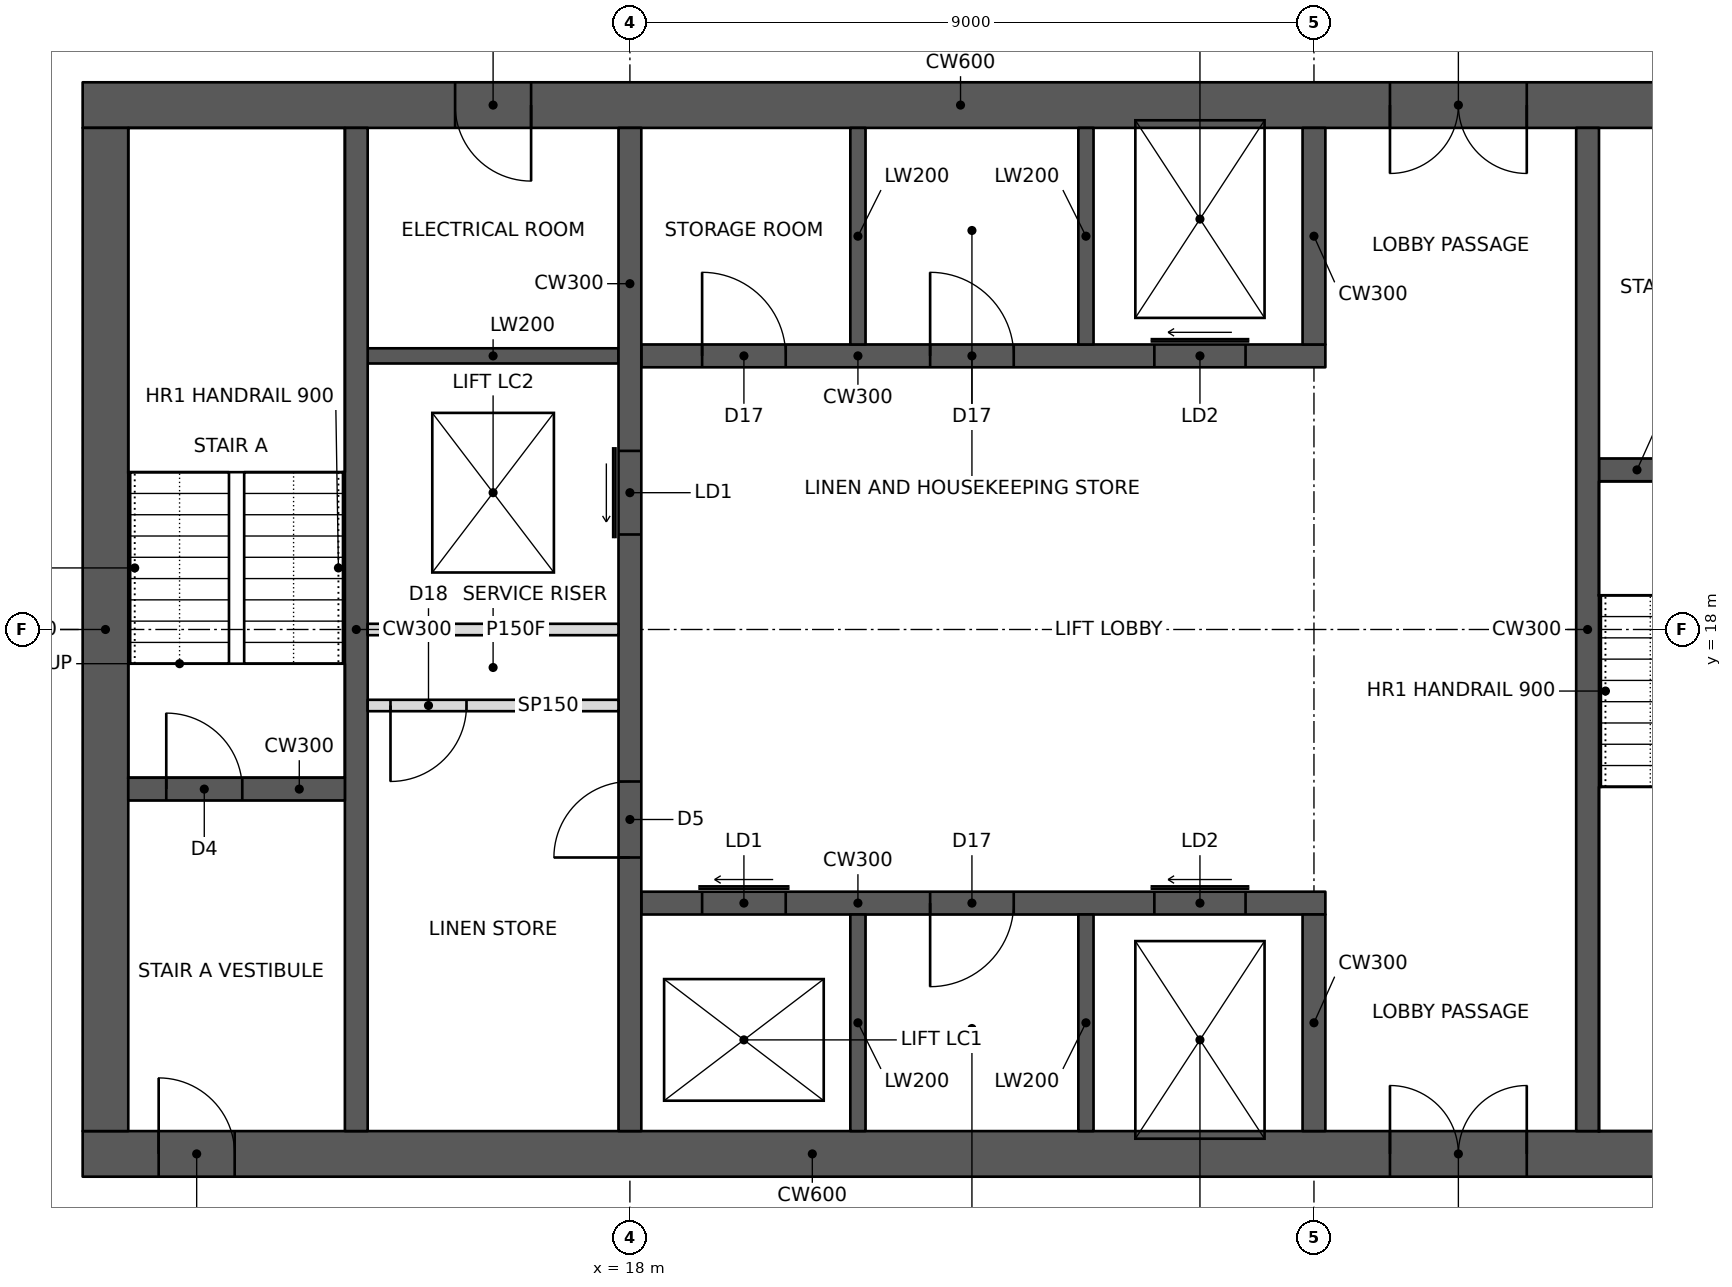
"""IFC4 building model, lengths in metres.
Left out: names, types, materials, properties, quantities, classifications, styles, units other than length and angle.
Written with IfcOpenShell. Run it as: python <this file> out.ifc"""

import sys

from ifc_helpers import new_model, si_unit, direction, frame, frame_2d, origin, place, context, subcontext, project, spatial, rectangle, extrude, element, fill, save


model = new_model("IFC4")
c1 = context("Model", 3, precision=1e-05, world=origin(), true_north=direction((0.0, 1.0)))
c2 = subcontext(c1, "Body", "Model", "MODEL_VIEW")
j1 = project(units=[si_unit("LENGTHUNIT", "METRE"), si_unit("PLANEANGLEUNIT", "RADIAN")], contexts=[c1])
p1 = place(None, origin())
s1 = spatial("IfcSite", under=j1, at=p1, CompositionType="ELEMENT")
p2 = place(p1, origin())
s2 = spatial("IfcBuilding", under=s1, at=p2, CompositionType="ELEMENT")
p3 = place(p2, frame((0.0, 0.0, 177.4)))
s3 = spatial("IfcBuildingStorey", under=s2, at=p3, CompositionType="ELEMENT", Elevation=177.4)
p4 = place(p3, frame((10.8, 11.1, 0.0), z_axis=(0.0, 0.0, 1.0), x_axis=(1.0, 0.0, 0.0)))
e1 = element("IfcWall", 1, at=p4, inside=s3, PredefinedType="SHEAR", context=c2, shape_type="SweptSolid", body=[
    extrude(rectangle(XDim=23.4, YDim=0.6, at=frame_2d((11.7, 0.0))), origin(), (0.0, 0.0, 1.0), 3.4),
])
p5 = place(p4, frame((1.0, 0.0, 0.0)))
e2 = element("IfcOpeningElement", 2, at=p5, cuts=e1, PredefinedType="OPENING", context=c2, shape_type="SweptSolid", body=[
    extrude(rectangle(XDim=1.0, YDim=2.1, at=frame_2d((0.5, 1.05))), frame((0.0, 0.31, 0.0), z_axis=(0.0, -1.0, 0.0), x_axis=(1.0, 0.0, 0.0)), (0.0, 0.0, 1.0), 0.62),
])
p6 = place(p4, frame((17.2, 0.0, 0.0)))
e3 = element("IfcOpeningElement", 3, at=p6, cuts=e1, PredefinedType="OPENING", context=c2, shape_type="SweptSolid", body=[
    extrude(rectangle(XDim=1.8, YDim=2.1, at=frame_2d((0.9, 1.05))), frame((0.0, 0.31, 0.0), z_axis=(0.0, -1.0, 0.0), x_axis=(1.0, 0.0, 0.0)), (0.0, 0.0, 1.0), 0.62),
])
p7 = place(p3, frame((10.8, 24.9, 0.0), z_axis=(0.0, 0.0, 1.0), x_axis=(1.0, 0.0, 0.0)))
e4 = element("IfcWall", 4, at=p7, inside=s3, PredefinedType="SHEAR", context=c2, shape_type="SweptSolid", body=[
    extrude(rectangle(XDim=23.4, YDim=0.6, at=frame_2d((11.7, 0.0))), origin(), (0.0, 0.0, 1.0), 3.4),
])
p8 = place(p7, frame((17.2, 0.0, 0.0)))
e5 = element("IfcOpeningElement", 5, at=p8, cuts=e4, PredefinedType="OPENING", context=c2, shape_type="SweptSolid", body=[
    extrude(rectangle(XDim=1.8, YDim=2.1, at=frame_2d((0.9, 1.05))), frame((0.0, 0.31, 0.0), z_axis=(0.0, -1.0, 0.0), x_axis=(1.0, 0.0, 0.0)), (0.0, 0.0, 1.0), 0.62),
])
p9 = place(p7, frame((21.1, 0.0, 0.0)))
e6 = element("IfcOpeningElement", 6, at=p9, cuts=e4, PredefinedType="OPENING", context=c2, shape_type="SweptSolid", body=[
    extrude(rectangle(XDim=1.0, YDim=2.1, at=frame_2d((0.5, 1.05))), frame((0.0, 0.31, 0.0), z_axis=(0.0, -1.0, 0.0), x_axis=(1.0, 0.0, 0.0)), (0.0, 0.0, 1.0), 0.62),
])
p10 = place(p7, frame((4.9, 0.0, 0.0)))
e7 = element("IfcOpeningElement", 7, at=p10, cuts=e4, PredefinedType="OPENING", context=c2, shape_type="SweptSolid", body=[
    extrude(rectangle(XDim=1.0, YDim=2.1, at=frame_2d((0.5, 1.05))), frame((0.0, 0.31, 0.0), z_axis=(0.0, -1.0, 0.0), x_axis=(1.0, 0.0, 0.0)), (0.0, 0.0, 1.0), 0.62),
])
p11 = place(p3, frame((11.1, 11.4, 0.0), z_axis=(0.0, 0.0, 1.0), x_axis=(0.0, 1.0, 0.0)))
e8 = element("IfcWall", 8, at=p11, inside=s3, PredefinedType="SHEAR", context=c2, shape_type="SweptSolid", body=[
    extrude(rectangle(XDim=13.2, YDim=0.6, at=frame_2d((6.6, 0.0))), origin(), (0.0, 0.0, 1.0), 3.4),
])
p12 = place(p3, frame((14.4, 11.4, 0.0), z_axis=(0.0, 0.0, 1.0), x_axis=(0.0, 1.0, 0.0)))
e9 = element("IfcWall", 9, at=p12, inside=s3, PredefinedType="SHEAR", context=c2, shape_type="SweptSolid", body=[
    extrude(rectangle(XDim=13.2, YDim=0.3, at=frame_2d((6.6, 0.0))), origin(), (0.0, 0.0, 1.0), 3.4),
])
p13 = place(p3, frame((11.4, 15.9, 0.0), z_axis=(0.0, 0.0, 1.0), x_axis=(1.0, 0.0, 0.0)))
e10 = element("IfcWall", 10, at=p13, inside=s3, PredefinedType="SHEAR", context=c2, shape_type="SweptSolid", body=[
    extrude(rectangle(XDim=2.85, YDim=0.3, at=frame_2d((1.425, 0.0))), origin(), (0.0, 0.0, 1.0), 3.4),
])
p14 = place(p13, frame((0.5, 0.0, 0.0)))
e11 = element("IfcOpeningElement", 11, at=p14, cuts=e10, PredefinedType="OPENING", context=c2, shape_type="SweptSolid", body=[
    extrude(rectangle(XDim=1.0, YDim=2.1, at=frame_2d((0.5, 1.05))), frame((0.0, 0.16, 0.0), z_axis=(0.0, -1.0, 0.0), x_axis=(1.0, 0.0, 0.0)), (0.0, 0.0, 1.0), 0.32),
])
p15 = place(p3, frame((18.0, 11.4, 0.0), z_axis=(0.0, 0.0, 1.0), x_axis=(0.0, 1.0, 0.0)))
e12 = element("IfcWall", 12, at=p15, inside=s3, PredefinedType="SHEAR", context=c2, shape_type="SweptSolid", body=[
    extrude(rectangle(XDim=13.2, YDim=0.3, at=frame_2d((6.6, 0.0))), origin(), (0.0, 0.0, 1.0), 3.4),
])
p16 = place(p15, frame((3.6, 0.0, 0.0)))
e13 = element("IfcOpeningElement", 13, at=p16, cuts=e12, PredefinedType="OPENING", context=c2, shape_type="SweptSolid", body=[
    extrude(rectangle(XDim=1.0, YDim=2.1, at=frame_2d((0.5, 1.05))), frame((0.0, 0.16, 0.0), z_axis=(0.0, -1.0, 0.0), x_axis=(1.0, 0.0, 0.0)), (0.0, 0.0, 1.0), 0.32),
])
p17 = place(p15, frame((7.85, 0.0, 0.0)))
e14 = element("IfcOpeningElement", 14, at=p17, cuts=e12, PredefinedType="OPENING", context=c2, shape_type="SweptSolid", body=[
    extrude(rectangle(XDim=1.1, YDim=2.1, at=frame_2d((0.55, 1.05))), frame((0.0, 0.16, 0.0), z_axis=(0.0, -1.0, 0.0), x_axis=(1.0, 0.0, 0.0)), (0.0, 0.0, 1.0), 0.32),
])
p18 = place(p3, frame((14.55, 18.0, 0.0), z_axis=(0.0, 0.0, 1.0), x_axis=(1.0, 0.0, 0.0)))
e15 = element("IfcWall", 15, at=p18, inside=s3, PredefinedType="PARTITIONING", context=c2, shape_type="SweptSolid", body=[
    extrude(rectangle(XDim=3.3, YDim=0.15, at=frame_2d((1.65, 0.0))), origin(), (0.0, 0.0, 1.0), 3.2),
])
p19 = place(p3, frame((18.15, 14.4, 0.0), z_axis=(0.0, 0.0, 1.0), x_axis=(1.0, 0.0, 0.0)))
e16 = element("IfcWall", 16, at=p19, inside=s3, PredefinedType="SHEAR", context=c2, shape_type="SweptSolid", body=[
    extrude(rectangle(XDim=9.0, YDim=0.3, at=frame_2d((4.5, 0.0))), origin(), (0.0, 0.0, 1.0), 3.4),
])
p20 = place(p19, frame((0.8, 0.0, 0.0)))
e17 = element("IfcOpeningElement", 17, at=p20, cuts=e16, PredefinedType="OPENING", context=c2, shape_type="SweptSolid", body=[
    extrude(rectangle(XDim=1.1, YDim=2.1, at=frame_2d((0.55, 1.05))), frame((0.0, 0.16, 0.0), z_axis=(0.0, -1.0, 0.0), x_axis=(1.0, 0.0, 0.0)), (0.0, 0.0, 1.0), 0.32),
])
p21 = place(p19, frame((6.75, 0.0, 0.0)))
e18 = element("IfcOpeningElement", 18, at=p21, cuts=e16, PredefinedType="OPENING", context=c2, shape_type="SweptSolid", body=[
    extrude(rectangle(XDim=1.2, YDim=2.1, at=frame_2d((0.6, 1.05))), frame((0.0, 0.16, 0.0), z_axis=(0.0, -1.0, 0.0), x_axis=(1.0, 0.0, 0.0)), (0.0, 0.0, 1.0), 0.32),
])
p22 = place(p19, frame((3.8, 0.0, 0.0)))
e19 = element("IfcOpeningElement", 19, at=p22, cuts=e16, PredefinedType="OPENING", context=c2, shape_type="SweptSolid", body=[
    extrude(rectangle(XDim=1.1, YDim=2.1, at=frame_2d((0.55, 1.05))), frame((0.0, 0.16, 0.0), z_axis=(0.0, -1.0, 0.0), x_axis=(1.0, 0.0, 0.0)), (0.0, 0.0, 1.0), 0.32),
])
p23 = place(p3, frame((27.0, 11.4, 0.0), z_axis=(0.0, 0.0, 1.0), x_axis=(0.0, 1.0, 0.0)))
e20 = element("IfcWall", 20, at=p23, inside=s3, PredefinedType="SHEAR", context=c2, shape_type="SweptSolid", body=[
    extrude(rectangle(XDim=2.85, YDim=0.3, at=frame_2d((1.425, 0.0))), origin(), (0.0, 0.0, 1.0), 3.4),
])
for number, where, z_axis, x_axis in (
    (21, (21.0, 11.4, 0.0), (0.0, 0.0, 1.0), (0.0, 1.0, 0.0)),
    (22, (24.0, 11.4, 0.0), (0.0, 0.0, 1.0), (0.0, 1.0, 0.0)),
):
    element("IfcWall", number, at=place(p3, frame(where, z_axis=z_axis, x_axis=x_axis)), inside=s3, PredefinedType="SHEAR", context=c2, shape_type="SweptSolid", body=[
        extrude(rectangle(XDim=2.85, YDim=0.2, at=frame_2d((1.425, 0.0))), origin(), (0.0, 0.0, 1.0), 3.4),
    ])
p24 = place(p3, frame((18.15, 21.6, 0.0), z_axis=(0.0, 0.0, 1.0), x_axis=(1.0, 0.0, 0.0)))
e23 = element("IfcWall", 23, at=p24, inside=s3, PredefinedType="SHEAR", context=c2, shape_type="SweptSolid", body=[
    extrude(rectangle(XDim=9.0, YDim=0.3, at=frame_2d((4.5, 0.0))), origin(), (0.0, 0.0, 1.0), 3.4),
])
p25 = place(p24, frame((6.75, 0.0, 0.0)))
e24 = element("IfcOpeningElement", 24, at=p25, cuts=e23, PredefinedType="OPENING", context=c2, shape_type="SweptSolid", body=[
    extrude(rectangle(XDim=1.2, YDim=2.1, at=frame_2d((0.6, 1.05))), frame((0.0, 0.16, 0.0), z_axis=(0.0, -1.0, 0.0), x_axis=(1.0, 0.0, 0.0)), (0.0, 0.0, 1.0), 0.32),
])
p26 = place(p24, frame((0.8, 0.0, 0.0)))
e25 = element("IfcOpeningElement", 25, at=p26, cuts=e23, PredefinedType="OPENING", context=c2, shape_type="SweptSolid", body=[
    extrude(rectangle(XDim=1.1, YDim=2.1, at=frame_2d((0.55, 1.05))), frame((0.0, 0.16, 0.0), z_axis=(0.0, -1.0, 0.0), x_axis=(1.0, 0.0, 0.0)), (0.0, 0.0, 1.0), 0.32),
])
p27 = place(p24, frame((3.8, 0.0, 0.0)))
e26 = element("IfcOpeningElement", 26, at=p27, cuts=e23, PredefinedType="OPENING", context=c2, shape_type="SweptSolid", body=[
    extrude(rectangle(XDim=1.1, YDim=2.1, at=frame_2d((0.55, 1.05))), frame((0.0, 0.16, 0.0), z_axis=(0.0, -1.0, 0.0), x_axis=(1.0, 0.0, 0.0)), (0.0, 0.0, 1.0), 0.32),
])
p28 = place(p3, frame((27.0, 21.75, 0.0), z_axis=(0.0, 0.0, 1.0), x_axis=(0.0, 1.0, 0.0)))
e27 = element("IfcWall", 27, at=p28, inside=s3, PredefinedType="SHEAR", context=c2, shape_type="SweptSolid", body=[
    extrude(rectangle(XDim=2.85, YDim=0.3, at=frame_2d((1.425, 0.0))), origin(), (0.0, 0.0, 1.0), 3.4),
])
for number, where, z_axis, x_axis in (
    (28, (21.0, 21.75, 0.0), (0.0, 0.0, 1.0), (0.0, 1.0, 0.0)),
    (29, (24.0, 21.75, 0.0), (0.0, 0.0, 1.0), (0.0, 1.0, 0.0)),
):
    element("IfcWall", number, at=place(p3, frame(where, z_axis=z_axis, x_axis=x_axis)), inside=s3, PredefinedType="SHEAR", context=c2, shape_type="SweptSolid", body=[
        extrude(rectangle(XDim=2.85, YDim=0.2, at=frame_2d((1.425, 0.0))), origin(), (0.0, 0.0, 1.0), 3.4),
    ])
p29 = place(p3, frame((30.6, 11.4, 0.0), z_axis=(0.0, 0.0, 1.0), x_axis=(0.0, 1.0, 0.0)))
e30 = element("IfcWall", 30, at=p29, inside=s3, PredefinedType="SHEAR", context=c2, shape_type="SweptSolid", body=[
    extrude(rectangle(XDim=13.2, YDim=0.3, at=frame_2d((6.6, 0.0))), origin(), (0.0, 0.0, 1.0), 3.4),
])
p30 = place(p3, frame((30.75, 20.1, 0.0), z_axis=(0.0, 0.0, 1.0), x_axis=(1.0, 0.0, 0.0)))
e31 = element("IfcWall", 31, at=p30, inside=s3, PredefinedType="SHEAR", context=c2, shape_type="SweptSolid", body=[
    extrude(rectangle(XDim=2.85, YDim=0.3, at=frame_2d((1.425, 0.0))), origin(), (0.0, 0.0, 1.0), 3.4),
])
p31 = place(p30, frame((1.15, 0.0, 0.0)))
e32 = element("IfcOpeningElement", 32, at=p31, cuts=e31, PredefinedType="OPENING", context=c2, shape_type="SweptSolid", body=[
    extrude(rectangle(XDim=1.0, YDim=2.1, at=frame_2d((0.5, 1.05))), frame((0.0, 0.16, 0.0), z_axis=(0.0, -1.0, 0.0), x_axis=(1.0, 0.0, 0.0)), (0.0, 0.0, 1.0), 0.32),
])
p32 = place(p3, frame((14.55, 21.6, 0.0), z_axis=(0.0, 0.0, 1.0), x_axis=(1.0, 0.0, 0.0)))
e33 = element("IfcWall", 33, at=p32, inside=s3, PredefinedType="SHEAR", context=c2, shape_type="SweptSolid", body=[
    extrude(rectangle(XDim=3.3, YDim=0.2, at=frame_2d((1.65, 0.0))), origin(), (0.0, 0.0, 1.0), 3.4),
])
p33 = place(p3, frame((14.55, 17.0, 0.0), z_axis=(0.0, 0.0, 1.0), x_axis=(1.0, 0.0, 0.0)))
e34 = element("IfcWall", 34, at=p33, inside=s3, PredefinedType="PARTITIONING", context=c2, shape_type="SweptSolid", body=[
    extrude(rectangle(XDim=3.3, YDim=0.15, at=frame_2d((1.65, 0.0))), origin(), (0.0, 0.0, 1.0), 3.2),
])
p34 = place(p33, frame((0.3, 0.0, 0.0)))
e35 = element("IfcOpeningElement", 35, at=p34, cuts=e34, PredefinedType="OPENING", context=c2, shape_type="SweptSolid", body=[
    extrude(rectangle(XDim=1.0, YDim=2.1, at=frame_2d((0.5, 1.05))), frame((0.0, 0.085, 0.0), z_axis=(0.0, -1.0, 0.0), x_axis=(1.0, 0.0, 0.0)), (0.0, 0.0, 1.0), 0.17),
])
p35 = place(p34, frame((1.0, 0.0, 0.0), z_axis=(0.0, 0.0, 1.0), x_axis=(-1.0, 0.0, 0.0)))
e36 = element("IfcDoor", 36, at=p35, inside=s3, OperationType="SINGLE_SWING_RIGHT", PredefinedType="DOOR", context=c2, shape_type="SweptSolid", body=[
    extrude(rectangle(XDim=1.0, YDim=2.1, at=frame_2d((0.5, 1.05))), frame((0.0, 0.025, 0.0), z_axis=(0.0, -1.0, 0.0), x_axis=(1.0, 0.0, 0.0)), (0.0, 0.0, 1.0), 0.05),
])
fill(e35, e36)
p36 = place(p5, origin())
e37 = element("IfcDoor", 37, at=p36, inside=s3, OperationType="SINGLE_SWING_LEFT", PredefinedType="DOOR", context=c2, shape_type="SweptSolid", body=[
    extrude(rectangle(XDim=1.0, YDim=2.1, at=frame_2d((0.5, 1.05))), frame((0.0, 0.025, 0.0), z_axis=(0.0, -1.0, 0.0), x_axis=(1.0, 0.0, 0.0)), (0.0, 0.0, 1.0), 0.05),
])
fill(e2, e37)
p37 = place(p14, origin())
e38 = element("IfcDoor", 38, at=p37, inside=s3, OperationType="SINGLE_SWING_LEFT", PredefinedType="DOOR", context=c2, shape_type="SweptSolid", body=[
    extrude(rectangle(XDim=1.0, YDim=2.1, at=frame_2d((0.5, 1.05))), frame((0.0, 0.025, 0.0), z_axis=(0.0, -1.0, 0.0), x_axis=(1.0, 0.0, 0.0)), (0.0, 0.0, 1.0), 0.05),
])
fill(e11, e38)
p38 = place(p6, origin())
e39 = element("IfcDoor", 39, at=p38, inside=s3, OperationType="DOUBLE_DOOR_SINGLE_SWING", PredefinedType="DOOR", context=c2, shape_type="SweptSolid", body=[
    extrude(rectangle(XDim=1.8, YDim=2.1, at=frame_2d((0.9, 1.05))), frame((0.0, 0.025, 0.0), z_axis=(0.0, -1.0, 0.0), x_axis=(1.0, 0.0, 0.0)), (0.0, 0.0, 1.0), 0.05),
])
fill(e3, e39)
p39 = place(p8, frame((1.8, 0.0, 0.0), z_axis=(0.0, 0.0, 1.0), x_axis=(-1.0, 0.0, 0.0)))
e40 = element("IfcDoor", 40, at=p39, inside=s3, OperationType="DOUBLE_DOOR_SINGLE_SWING", PredefinedType="DOOR", context=c2, shape_type="SweptSolid", body=[
    extrude(rectangle(XDim=1.8, YDim=2.1, at=frame_2d((0.9, 1.05))), frame((0.0, 0.025, 0.0), z_axis=(0.0, -1.0, 0.0), x_axis=(1.0, 0.0, 0.0)), (0.0, 0.0, 1.0), 0.05),
])
fill(e5, e40)
p40 = place(p16, origin())
e41 = element("IfcDoor", 41, at=p40, inside=s3, OperationType="SINGLE_SWING_LEFT", PredefinedType="DOOR", context=c2, shape_type="SweptSolid", body=[
    extrude(rectangle(XDim=1.0, YDim=2.1, at=frame_2d((0.5, 1.05))), frame((0.0, 0.025, 0.0), z_axis=(0.0, -1.0, 0.0), x_axis=(1.0, 0.0, 0.0)), (0.0, 0.0, 1.0), 0.05),
])
fill(e13, e41)
p41 = place(p10, frame((1.0, 0.0, 0.0), z_axis=(0.0, 0.0, 1.0), x_axis=(-1.0, 0.0, 0.0)))
e42 = element("IfcDoor", 42, at=p41, inside=s3, OperationType="SINGLE_SWING_LEFT", PredefinedType="DOOR", context=c2, shape_type="SweptSolid", body=[
    extrude(rectangle(XDim=1.0, YDim=2.1, at=frame_2d((0.5, 1.05))), frame((0.0, 0.025, 0.0), z_axis=(0.0, -1.0, 0.0), x_axis=(1.0, 0.0, 0.0)), (0.0, 0.0, 1.0), 0.05),
])
fill(e7, e42)
p42 = place(p20, origin())
e43 = element("IfcDoor", 43, at=p42, inside=s3, OperationType="SLIDING_TO_LEFT", PredefinedType="DOOR", context=c2, shape_type="SweptSolid", body=[
    extrude(rectangle(XDim=1.1, YDim=2.1, at=frame_2d((0.55, 1.05))), frame((0.0, 0.025, 0.0), z_axis=(0.0, -1.0, 0.0), x_axis=(1.0, 0.0, 0.0)), (0.0, 0.0, 1.0), 0.05),
])
fill(e17, e43)
p43 = place(p17, origin())
e44 = element("IfcDoor", 44, at=p43, inside=s3, OperationType="SLIDING_TO_LEFT", PredefinedType="DOOR", context=c2, shape_type="SweptSolid", body=[
    extrude(rectangle(XDim=1.1, YDim=2.1, at=frame_2d((0.55, 1.05))), frame((0.0, 0.025, 0.0), z_axis=(0.0, -1.0, 0.0), x_axis=(1.0, 0.0, 0.0)), (0.0, 0.0, 1.0), 0.05),
])
fill(e14, e44)
p44 = place(p21, origin())
e45 = element("IfcDoor", 45, at=p44, inside=s3, OperationType="SLIDING_TO_LEFT", PredefinedType="DOOR", context=c2, shape_type="SweptSolid", body=[
    extrude(rectangle(XDim=1.2, YDim=2.1, at=frame_2d((0.6, 1.05))), frame((0.0, 0.025, 0.0), z_axis=(0.0, -1.0, 0.0), x_axis=(1.0, 0.0, 0.0)), (0.0, 0.0, 1.0), 0.05),
])
fill(e18, e45)
p45 = place(p25, origin())
e46 = element("IfcDoor", 46, at=p45, inside=s3, OperationType="SLIDING_TO_LEFT", PredefinedType="DOOR", context=c2, shape_type="SweptSolid", body=[
    extrude(rectangle(XDim=1.2, YDim=2.1, at=frame_2d((0.6, 1.05))), frame((0.0, 0.025, 0.0), z_axis=(0.0, -1.0, 0.0), x_axis=(1.0, 0.0, 0.0)), (0.0, 0.0, 1.0), 0.05),
])
fill(e24, e46)
p46 = place(p26, origin())
e47 = element("IfcDoor", 47, at=p46, inside=s3, OperationType="SINGLE_SWING_LEFT", PredefinedType="DOOR", context=c2, shape_type="SweptSolid", body=[
    extrude(rectangle(XDim=1.1, YDim=2.1, at=frame_2d((0.55, 1.05))), frame((0.0, 0.025, 0.0), z_axis=(0.0, -1.0, 0.0), x_axis=(1.0, 0.0, 0.0)), (0.0, 0.0, 1.0), 0.05),
])
fill(e25, e47)
p47 = place(p27, origin())
e48 = element("IfcDoor", 48, at=p47, inside=s3, OperationType="SINGLE_SWING_LEFT", PredefinedType="DOOR", context=c2, shape_type="SweptSolid", body=[
    extrude(rectangle(XDim=1.1, YDim=2.1, at=frame_2d((0.55, 1.05))), frame((0.0, 0.025, 0.0), z_axis=(0.0, -1.0, 0.0), x_axis=(1.0, 0.0, 0.0)), (0.0, 0.0, 1.0), 0.05),
])
fill(e26, e48)
p48 = place(p22, frame((1.1, 0.0, 0.0), z_axis=(0.0, 0.0, 1.0), x_axis=(-1.0, 0.0, 0.0)))
e49 = element("IfcDoor", 49, at=p48, inside=s3, OperationType="SINGLE_SWING_RIGHT", PredefinedType="DOOR", context=c2, shape_type="SweptSolid", body=[
    extrude(rectangle(XDim=1.1, YDim=2.1, at=frame_2d((0.55, 1.05))), frame((0.0, 0.025, 0.0), z_axis=(0.0, -1.0, 0.0), x_axis=(1.0, 0.0, 0.0)), (0.0, 0.0, 1.0), 0.05),
])
fill(e19, e49)
save(model, sys.argv[1])
